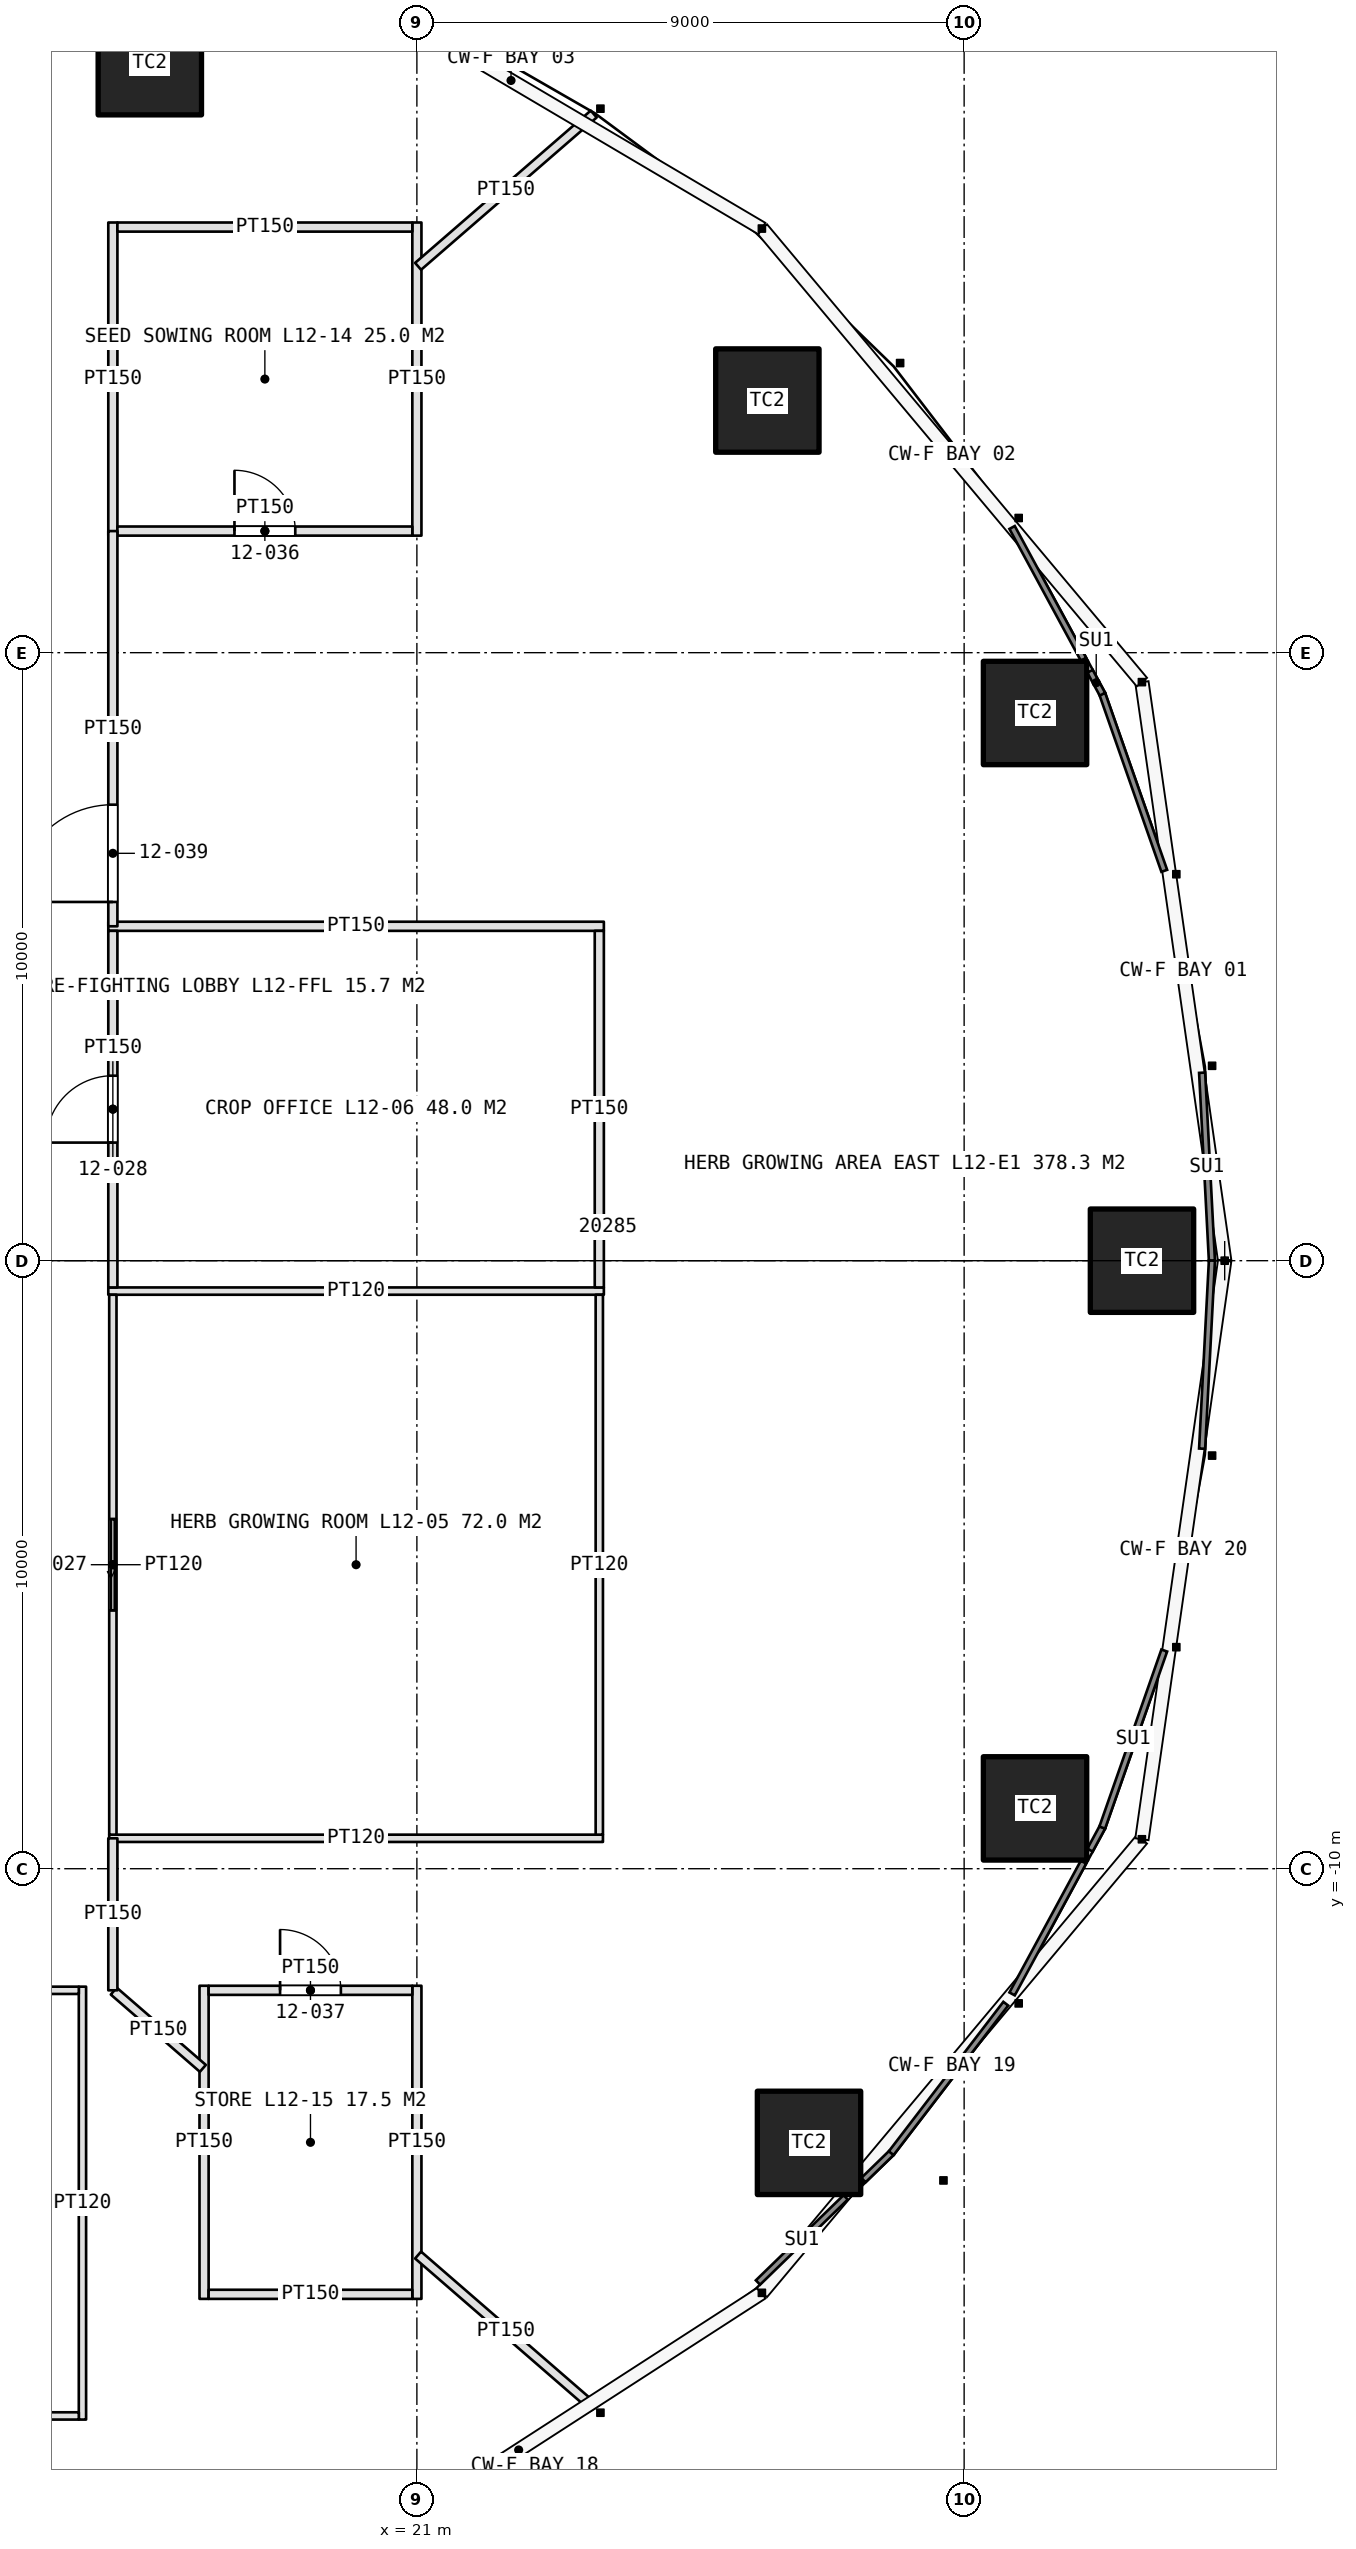
"""IFC4 building model, lengths in metres.
Left out: names, types, materials, properties, quantities, classifications, styles, units other than length and angle.
Written with IfcOpenShell. Run it as: python <this file> out.ifc"""

import sys

from ifc_helpers import new_model, si_unit, direction, frame, frame_2d, origin, origin_2d, place, context, subcontext, project, spatial, rectangle, extrude, element, fill, save


model = new_model("IFC4")
c1 = context("Model", 3, precision=1e-05, world=origin(), true_north=direction((0.0, 1.0)))
c2 = subcontext(c1, "Body", "Model", "MODEL_VIEW")
j1 = project(units=[si_unit("LENGTHUNIT", "METRE"), si_unit("PLANEANGLEUNIT", "RADIAN")], contexts=[c1])
p1 = place(None, origin())
s1 = spatial("IfcSite", under=j1, at=p1, CompositionType="ELEMENT")
p2 = place(p1, origin())
s2 = spatial("IfcBuilding", under=s1, at=p2, CompositionType="ELEMENT")
p3 = place(p2, frame((0.0, 0.0, 60.0)))
s3 = spatial("IfcBuildingStorey", under=s2, at=p3, CompositionType="ELEMENT", Elevation=60.0)
for number, where, z_axis, x_axis in (
    (1, (32.925, 0.0, 0.0), (0.0, 0.0, 1.0), (1.0, 0.0, 0.0)),
    (2, (31.166, 9.008, 0.0), (0.0, 0.0, 1.0), (1.0, 0.0, 0.0)),
    (3, (26.764, 14.147, 0.0), (0.0, 0.0, 1.0), (1.0, 0.0, 0.0)),
    (4, (16.608, 19.695, 0.0), (0.0, 0.0, 1.0), (1.0, 0.0, 0.0)),
    (5, (27.449, -14.509, 0.0), (0.0, 0.0, 1.0), (1.0, 0.0, 0.0)),
    (6, (31.166, -9.008, 0.0), (0.0, 0.0, 1.0), (1.0, 0.0, 0.0)),
):
    element("IfcColumn", number, at=place(p3, frame(where, z_axis=z_axis, x_axis=x_axis)), inside=s3, PredefinedType="COLUMN", context=c2, shape_type="SweptSolid", body=[
        extrude(rectangle(XDim=1.7, YDim=1.7, at=origin_2d()), origin(), (0.0, 0.0, 1.0), 5.0),
    ])
p4 = place(p3, frame((15.94, -9.5, 0.0), z_axis=(0.0, 0.0, 1.0), x_axis=(1.0, 0.0, 0.0)))
e7 = element("IfcWall", 7, at=p4, inside=s3, PredefinedType="PARTITIONING", context=c2, shape_type="SweptSolid", body=[
    extrude(rectangle(XDim=8.12, YDim=0.12, at=frame_2d((4.06, 0.0))), origin(), (0.0, 0.0, 1.0), 3.6),
])
p5 = place(p3, frame((15.925, -0.5, 0.0), z_axis=(0.0, 0.0, 1.0), x_axis=(1.0, 0.0, 0.0)))
e8 = element("IfcWall", 8, at=p5, inside=s3, PredefinedType="PARTITIONING", context=c2, shape_type="SweptSolid", body=[
    extrude(rectangle(XDim=8.15, YDim=0.12, at=frame_2d((4.075, 0.0))), origin(), (0.0, 0.0, 1.0), 3.6),
])
p6 = place(p3, frame((15.925, 5.5, 0.0), z_axis=(0.0, 0.0, 1.0), x_axis=(1.0, 0.0, 0.0)))
e9 = element("IfcWall", 9, at=p6, inside=s3, PredefinedType="PARTITIONING", context=c2, shape_type="SweptSolid", body=[
    extrude(rectangle(XDim=8.15, YDim=0.15, at=frame_2d((4.075, 0.0))), origin(), (0.0, 0.0, 1.0), 3.6),
])
p7 = place(p3, frame((16.0, -9.44, 0.0), z_axis=(0.0, 0.0, 1.0), x_axis=(0.0, 1.0, 0.0)))
e10 = element("IfcWall", 10, at=p7, inside=s3, PredefinedType="PARTITIONING", context=c2, shape_type="SweptSolid", body=[
    extrude(rectangle(XDim=8.88, YDim=0.12, at=frame_2d((4.44, 0.0))), origin(), (0.0, 0.0, 1.0), 3.6),
])
p8 = place(p7, frame((3.69, 0.0, 0.0)))
e11 = element("IfcOpeningElement", 11, at=p8, cuts=e10, PredefinedType="OPENING", context=c2, shape_type="SweptSolid", body=[
    extrude(rectangle(XDim=1.5, YDim=2.5, at=frame_2d((0.75, 1.25))), frame((0.0, 0.07, 0.0), z_axis=(0.0, -1.0, 0.0), x_axis=(1.0, 0.0, 0.0)), (0.0, 0.0, 1.0), 0.14),
])
p9 = place(p3, frame((24.0, -9.44, 0.0), z_axis=(0.0, 0.0, 1.0), x_axis=(0.0, 1.0, 0.0)))
e12 = element("IfcWall", 12, at=p9, inside=s3, PredefinedType="PARTITIONING", context=c2, shape_type="SweptSolid", body=[
    extrude(rectangle(XDim=8.88, YDim=0.12, at=frame_2d((4.44, 0.0))), origin(), (0.0, 0.0, 1.0), 3.6),
])
p10 = place(p3, frame((16.0, -0.44, 0.0), z_axis=(0.0, 0.0, 1.0), x_axis=(0.0, 1.0, 0.0)))
e13 = element("IfcWall", 13, at=p10, inside=s3, PredefinedType="PARTITIONING", context=c2, shape_type="SweptSolid", body=[
    extrude(rectangle(XDim=5.865, YDim=0.15, at=frame_2d((2.933, 0.0))), origin(), (0.0, 0.0, 1.0), 3.6),
])
p11 = place(p10, frame((2.383, 0.0, 0.0)))
e14 = element("IfcOpeningElement", 14, at=p11, cuts=e13, PredefinedType="OPENING", context=c2, shape_type="SweptSolid", body=[
    extrude(rectangle(XDim=1.1, YDim=2.3, at=frame_2d((0.55, 1.15))), frame((0.0, 0.085, 0.0), z_axis=(0.0, -1.0, 0.0), x_axis=(1.0, 0.0, 0.0)), (0.0, 0.0, 1.0), 0.17),
])
p12 = place(p3, frame((24.0, -0.44, 0.0), z_axis=(0.0, 0.0, 1.0), x_axis=(0.0, 1.0, 0.0)))
e15 = element("IfcWall", 15, at=p12, inside=s3, PredefinedType="PARTITIONING", context=c2, shape_type="SweptSolid", body=[
    extrude(rectangle(XDim=5.865, YDim=0.15, at=frame_2d((2.933, 0.0))), origin(), (0.0, 0.0, 1.0), 3.6),
])
p13 = place(p3, frame((15.5, -11.94, 0.0), z_axis=(0.0, 0.0, 1.0), x_axis=(0.0, -1.0, 0.0)))
e16 = element("IfcWall", 16, at=p13, inside=s3, PredefinedType="PARTITIONING", context=c2, shape_type="SweptSolid", body=[
    extrude(rectangle(XDim=7.12, YDim=0.12, at=frame_2d((3.56, 0.0))), origin(), (0.0, 0.0, 1.0), 3.6),
])
p14 = place(p3, frame((9.56, -12.0, 0.0), z_axis=(0.0, 0.0, 1.0), x_axis=(1.0, 0.0, 0.0)))
e17 = element("IfcWall", 17, at=p14, inside=s3, PredefinedType="PARTITIONING", context=c2, shape_type="SweptSolid", body=[
    extrude(rectangle(XDim=5.88, YDim=0.12, at=frame_2d((2.94, 0.0))), origin(), (0.0, 0.0, 1.0), 3.6),
])
p15 = place(p14, frame((2.19, 0.0, 0.0)))
e18 = element("IfcOpeningElement", 18, at=p15, cuts=e17, PredefinedType="OPENING", context=c2, shape_type="SweptSolid", body=[
    extrude(rectangle(XDim=1.5, YDim=2.5, at=frame_2d((0.75, 1.25))), frame((0.0, 0.07, 0.0), z_axis=(0.0, -1.0, 0.0), x_axis=(1.0, 0.0, 0.0)), (0.0, 0.0, 1.0), 0.14),
])
p16 = place(p3, frame((9.56, -19.0, 0.0), z_axis=(0.0, 0.0, 1.0), x_axis=(1.0, 0.0, 0.0)))
e19 = element("IfcWall", 19, at=p16, inside=s3, PredefinedType="PARTITIONING", context=c2, shape_type="SweptSolid", body=[
    extrude(rectangle(XDim=5.88, YDim=0.12, at=frame_2d((2.94, 0.0))), origin(), (0.0, 0.0, 1.0), 3.6),
])
for number, where, z_axis, x_axis in (
    (20, (16.0, 11.925, 0.0), (0.0, 0.0, 1.0), (0.0, 1.0, 0.0)),
    (21, (21.0, 11.925, 0.0), (0.0, 0.0, 1.0), (0.0, 1.0, 0.0)),
):
    element("IfcWall", number, at=place(p3, frame(where, z_axis=z_axis, x_axis=x_axis)), inside=s3, PredefinedType="PARTITIONING", context=c2, shape_type="SweptSolid", body=[
        extrude(rectangle(XDim=5.15, YDim=0.15, at=frame_2d((2.575, 0.0))), origin(), (0.0, 0.0, 1.0), 3.6),
    ])
p17 = place(p3, frame((16.075, 12.0, 0.0), z_axis=(0.0, 0.0, 1.0), x_axis=(1.0, 0.0, 0.0)))
e22 = element("IfcWall", 22, at=p17, inside=s3, PredefinedType="PARTITIONING", context=c2, shape_type="SweptSolid", body=[
    extrude(rectangle(XDim=4.85, YDim=0.15, at=frame_2d((2.425, 0.0))), origin(), (0.0, 0.0, 1.0), 3.6),
])
p18 = place(p17, frame((1.925, 0.0, 0.0)))
e23 = element("IfcOpeningElement", 23, at=p18, cuts=e22, PredefinedType="OPENING", context=c2, shape_type="SweptSolid", body=[
    extrude(rectangle(XDim=1.0, YDim=2.2, at=frame_2d((0.5, 1.1))), frame((0.0, 0.085, 0.0), z_axis=(0.0, -1.0, 0.0), x_axis=(1.0, 0.0, 0.0)), (0.0, 0.0, 1.0), 0.17),
])
p19 = place(p3, frame((16.075, 17.0, 0.0), z_axis=(0.0, 0.0, 1.0), x_axis=(1.0, 0.0, 0.0)))
e24 = element("IfcWall", 24, at=p19, inside=s3, PredefinedType="PARTITIONING", context=c2, shape_type="SweptSolid", body=[
    extrude(rectangle(XDim=4.85, YDim=0.15, at=frame_2d((2.425, 0.0))), origin(), (0.0, 0.0, 1.0), 3.6),
])
for number, where, z_axis, x_axis in (
    (25, (17.5, -11.925, 0.0), (0.0, 0.0, 1.0), (0.0, -1.0, 0.0)),
    (26, (21.0, -11.925, 0.0), (0.0, 0.0, 1.0), (0.0, -1.0, 0.0)),
):
    element("IfcWall", number, at=place(p3, frame(where, z_axis=z_axis, x_axis=x_axis)), inside=s3, PredefinedType="PARTITIONING", context=c2, shape_type="SweptSolid", body=[
        extrude(rectangle(XDim=5.15, YDim=0.15, at=frame_2d((2.575, 0.0))), origin(), (0.0, 0.0, 1.0), 3.6),
    ])
p20 = place(p3, frame((17.575, -12.0, 0.0), z_axis=(0.0, 0.0, 1.0), x_axis=(1.0, 0.0, 0.0)))
e27 = element("IfcWall", 27, at=p20, inside=s3, PredefinedType="PARTITIONING", context=c2, shape_type="SweptSolid", body=[
    extrude(rectangle(XDim=3.35, YDim=0.15, at=frame_2d((1.675, 0.0))), origin(), (0.0, 0.0, 1.0), 3.6),
])
p21 = place(p20, frame((1.175, 0.0, 0.0)))
e28 = element("IfcOpeningElement", 28, at=p21, cuts=e27, PredefinedType="OPENING", context=c2, shape_type="SweptSolid", body=[
    extrude(rectangle(XDim=1.0, YDim=2.2, at=frame_2d((0.5, 1.1))), frame((0.0, 0.085, 0.0), z_axis=(0.0, -1.0, 0.0), x_axis=(1.0, 0.0, 0.0)), (0.0, 0.0, 1.0), 0.17),
])
p22 = place(p3, frame((17.575, -17.0, 0.0), z_axis=(0.0, 0.0, 1.0), x_axis=(1.0, 0.0, 0.0)))
e29 = element("IfcWall", 29, at=p22, inside=s3, PredefinedType="PARTITIONING", context=c2, shape_type="SweptSolid", body=[
    extrude(rectangle(XDim=3.35, YDim=0.15, at=frame_2d((1.675, 0.0))), origin(), (0.0, 0.0, 1.0), 3.6),
])
p23 = place(p3, frame((21.02, -16.354, 0.0), z_axis=(0.0, 0.0, 1.0), x_axis=(0.755425653008, -0.655234372402, 0.0)))
e30 = element("IfcWall", 30, at=p23, inside=s3, PredefinedType="PARTITIONING", context=c2, shape_type="SweptSolid", body=[
    extrude(rectangle(XDim=3.823, YDim=0.15, at=frame_2d((1.912, 0.0))), origin(), (0.0, 0.0, 1.0), 3.6),
])
p24 = place(p3, frame((16.015, -12.013, 0.0), z_axis=(0.0, 0.0, 1.0), x_axis=(0.755439771284, -0.65521809496, 0.0)))
e31 = element("IfcWall", 31, at=p24, inside=s3, PredefinedType="PARTITIONING", context=c2, shape_type="SweptSolid", body=[
    extrude(rectangle(XDim=1.939, YDim=0.15, at=frame_2d((0.969, 0.0))), origin(), (0.0, 0.0, 1.0), 3.6),
])
p25 = place(p3, frame((21.02, 16.354, 0.0), z_axis=(0.0, 0.0, 1.0), x_axis=(0.755425653008, 0.655234372402, 0.0)))
e32 = element("IfcWall", 32, at=p25, inside=s3, PredefinedType="PARTITIONING", context=c2, shape_type="SweptSolid", body=[
    extrude(rectangle(XDim=3.823, YDim=0.15, at=frame_2d((1.912, 0.0))), origin(), (0.0, 0.0, 1.0), 3.6),
])
p26 = place(p3, frame((16.0, -12.0, 0.0), z_axis=(0.0, 0.0, 1.0), x_axis=(0.0, 1.0, 0.0)))
e33 = element("IfcWall", 33, at=p26, inside=s3, PredefinedType="PARTITIONING", context=c2, shape_type="SweptSolid", body=[
    extrude(rectangle(XDim=2.5, YDim=0.15, at=frame_2d((1.25, 0.0))), origin(), (0.0, 0.0, 1.0), 3.6),
])
p27 = place(p3, frame((16.0, 5.5, 0.0), z_axis=(0.0, 0.0, 1.0), x_axis=(0.0, 1.0, 0.0)))
e34 = element("IfcWall", 34, at=p27, inside=s3, PredefinedType="PARTITIONING", context=c2, shape_type="SweptSolid", body=[
    extrude(rectangle(XDim=6.5, YDim=0.15, at=frame_2d((3.25, 0.0))), origin(), (0.0, 0.0, 1.0), 3.6),
])
p28 = place(p27, frame((0.4, 0.0, 0.0)))
e35 = element("IfcOpeningElement", 35, at=p28, cuts=e34, PredefinedType="OPENING", context=c2, shape_type="SweptSolid", body=[
    extrude(rectangle(XDim=1.6, YDim=2.4, at=frame_2d((0.8, 1.2))), frame((0.0, 0.085, 0.0), z_axis=(0.0, -1.0, 0.0), x_axis=(1.0, 0.0, 0.0)), (0.0, 0.0, 1.0), 0.17),
])
p29 = place(p8, origin())
e36 = element("IfcDoor", 36, at=p29, inside=s3, OperationType="SLIDING_TO_LEFT", PredefinedType="DOOR", context=c2, shape_type="SweptSolid", body=[
    extrude(rectangle(XDim=1.5, YDim=2.5, at=frame_2d((0.75, 1.25))), frame((0.0, 0.025, 0.0), z_axis=(0.0, -1.0, 0.0), x_axis=(1.0, 0.0, 0.0)), (0.0, 0.0, 1.0), 0.05),
])
fill(e11, e36)
p30 = place(p11, origin())
e37 = element("IfcDoor", 37, at=p30, inside=s3, OperationType="SINGLE_SWING_LEFT", PredefinedType="DOOR", context=c2, shape_type="SweptSolid", body=[
    extrude(rectangle(XDim=1.1, YDim=2.3, at=frame_2d((0.55, 1.15))), frame((0.0, 0.025, 0.0), z_axis=(0.0, -1.0, 0.0), x_axis=(1.0, 0.0, 0.0)), (0.0, 0.0, 1.0), 0.05),
])
fill(e14, e37)
p31 = place(p18, origin())
e38 = element("IfcDoor", 38, at=p31, inside=s3, OperationType="SINGLE_SWING_LEFT", PredefinedType="DOOR", context=c2, shape_type="SweptSolid", body=[
    extrude(rectangle(XDim=1.0, YDim=2.2, at=frame_2d((0.5, 1.1))), frame((0.0, 0.025, 0.0), z_axis=(0.0, -1.0, 0.0), x_axis=(1.0, 0.0, 0.0)), (0.0, 0.0, 1.0), 0.05),
])
fill(e23, e38)
p32 = place(p21, origin())
e39 = element("IfcDoor", 39, at=p32, inside=s3, OperationType="SINGLE_SWING_LEFT", PredefinedType="DOOR", context=c2, shape_type="SweptSolid", body=[
    extrude(rectangle(XDim=1.0, YDim=2.2, at=frame_2d((0.5, 1.1))), frame((0.0, 0.025, 0.0), z_axis=(0.0, -1.0, 0.0), x_axis=(1.0, 0.0, 0.0)), (0.0, 0.0, 1.0), 0.05),
])
fill(e28, e39)
p33 = place(p28, origin())
e40 = element("IfcDoor", 40, at=p33, inside=s3, OperationType="DOUBLE_DOOR_SINGLE_SWING", PredefinedType="DOOR", context=c2, shape_type="SweptSolid", body=[
    extrude(rectangle(XDim=1.6, YDim=2.4, at=frame_2d((0.8, 1.2))), frame((0.0, 0.025, 0.0), z_axis=(0.0, -1.0, 0.0), x_axis=(1.0, 0.0, 0.0)), (0.0, 0.0, 1.0), 0.05),
])
fill(e35, e40)
save(model, sys.argv[1])
